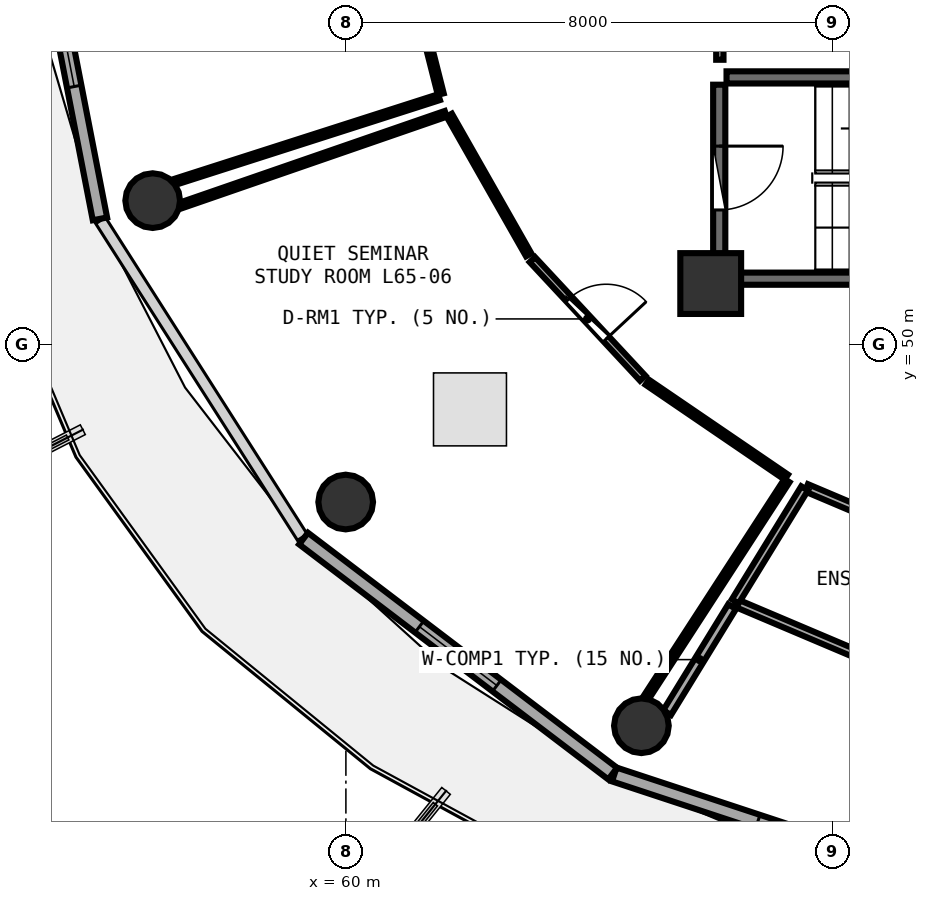
"""IFC4 building model, lengths in metres.
Left out: names, types, materials, properties, quantities, classifications, styles, units other than length and angle.
Written with IfcOpenShell. Run it as: python <this file> out.ifc"""

import sys

from ifc_helpers import new_model, si_unit, direction, frame, frame_2d, origin, origin_2d, place, context, subcontext, project, spatial, rectangle, circle, extrude, element, fill, save


model = new_model("IFC4")
c1 = context("Model", 3, precision=1e-05, world=origin(), true_north=direction((0.0, 1.0)))
c2 = subcontext(c1, "Body", "Model", "MODEL_VIEW")
j1 = project(units=[si_unit("LENGTHUNIT", "METRE"), si_unit("PLANEANGLEUNIT", "RADIAN")], contexts=[c1])
p1 = place(None, origin())
s1 = spatial("IfcSite", under=j1, at=p1, CompositionType="ELEMENT")
p2 = place(p1, origin())
s2 = spatial("IfcBuilding", under=s1, at=p2, CompositionType="ELEMENT")
p3 = place(p2, frame((0.0, 0.0, 256.2)))
s3 = spatial("IfcBuildingStorey", under=s2, at=p3, CompositionType="ELEMENT", Elevation=256.2)
p4 = place(p3, frame((66.0, 51.0, 0.0), z_axis=(0.0, 0.0, 1.0), x_axis=(1.0, 0.0, 0.0)))
e1 = element("IfcColumn", 1, at=p4, inside=s3, PredefinedType="PILASTER", context=c2, shape_type="SweptSolid", body=[
    extrude(rectangle(XDim=1.0, YDim=1.0, at=origin_2d()), origin(), (0.0, 0.0, 1.0), 3.75),
])
for number, where, z_axis, x_axis in (
    (2, (56.823, 52.364, 0.0), (0.0, 0.0, 1.0), (1.0, 0.0, 0.0)),
    (3, (59.997, 47.407, 0.0), (0.0, 0.0, 1.0), (1.0, 0.0, 0.0)),
    (4, (64.86, 43.728, 0.0), (0.0, 0.0, 1.0), (1.0, 0.0, 0.0)),
):
    element("IfcColumn", number, at=place(p3, frame(where, z_axis=z_axis, x_axis=x_axis)), inside=s3, PredefinedType="COLUMN", context=c2, shape_type="SweptSolid", body=[
        extrude(circle(Radius=0.45, at=origin_2d()), origin(), (0.0, 0.0, 1.0), 3.75),
    ])
p5 = place(p3, frame((54.803, 57.985, 0.0), z_axis=(0.0, 0.0, 1.0), x_axis=(0.190969309115, -0.981596008028, 0.0)))
e5 = element("IfcWall", 5, at=p5, inside=s3, PredefinedType="SOLIDWALL", context=c2, shape_type="SweptSolid", body=[
    extrude(rectangle(XDim=6.033, YDim=0.24, at=frame_2d((3.017, 0.0))), origin(), (0.0, 0.0, 1.0), 3.475),
])
p6 = place(p5, frame((2.216, 0.0, 0.85)))
e6 = element("IfcOpeningElement", 6, at=p6, cuts=e5, PredefinedType="OPENING", context=c2, shape_type="SweptSolid", body=[
    extrude(rectangle(XDim=1.6, YDim=1.45, at=frame_2d((0.8, 0.725))), frame((0.0, 0.13, 0.0), z_axis=(0.0, -1.0, 0.0), x_axis=(1.0, 0.0, 0.0)), (0.0, 0.0, 1.0), 0.26),
])
p7 = place(p3, frame((59.304, 46.806, 0.0), z_axis=(0.0, 0.0, 1.0), x_axis=(0.796010444211, -0.605282886514, 0.0)))
e7 = element("IfcWall", 7, at=p7, inside=s3, PredefinedType="SOLIDWALL", context=c2, shape_type="SweptSolid", body=[
    extrude(rectangle(XDim=6.387, YDim=0.24, at=frame_2d((3.194, 0.0))), origin(), (0.0, 0.0, 1.0), 3.475),
])
p8 = place(p7, frame((2.394, 0.0, 0.85)))
e8 = element("IfcOpeningElement", 8, at=p8, cuts=e7, PredefinedType="OPENING", context=c2, shape_type="SweptSolid", body=[
    extrude(rectangle(XDim=1.6, YDim=1.45, at=frame_2d((0.8, 0.725))), frame((0.0, 0.13, 0.0), z_axis=(0.0, -1.0, 0.0), x_axis=(1.0, 0.0, 0.0)), (0.0, 0.0, 1.0), 0.26),
])
p9 = place(p3, frame((64.414, 42.927, 0.0), z_axis=(0.0, 0.0, 1.0), x_axis=(0.949663708393, -0.313271193954, 0.0)))
e9 = element("IfcWall", 9, at=p9, inside=s3, PredefinedType="SOLIDWALL", context=c2, shape_type="SweptSolid", body=[
    extrude(rectangle(XDim=6.568, YDim=0.24, at=frame_2d((3.284, 0.0))), origin(), (0.0, 0.0, 1.0), 3.475),
])
p10 = place(p9, frame((2.484, 0.0, 0.85)))
e10 = element("IfcOpeningElement", 10, at=p10, cuts=e9, PredefinedType="OPENING", context=c2, shape_type="SweptSolid", body=[
    extrude(rectangle(XDim=1.6, YDim=1.45, at=frame_2d((0.8, 0.725))), frame((0.0, 0.13, 0.0), z_axis=(0.0, -1.0, 0.0), x_axis=(1.0, 0.0, 0.0)), (0.0, 0.0, 1.0), 0.26),
])
for number, where, z_axis, x_axis in (
    (11, (66.26, 51.08, 0.0), (0.0, 0.0, 1.0), (1.0, 0.0, 0.0)),
    (12, (73.42, 54.39, 0.0), (0.0, 0.0, 1.0), (-1.0, 0.0, 0.0)),
):
    element("IfcWall", number, at=place(p3, frame(where, z_axis=z_axis, x_axis=x_axis)), inside=s3, PredefinedType="SHEAR", context=c2, shape_type="SweptSolid", body=[
        extrude(rectangle(XDim=7.16, YDim=0.2, at=frame_2d((3.58, 0.0))), origin(), (0.0, 0.0, 1.0), 3.49),
    ])
p11 = place(p3, frame((66.14, 54.27, 0.0), z_axis=(0.0, 0.0, 1.0), x_axis=(0.0, -1.0, 0.0)))
e13 = element("IfcWall", 13, at=p11, inside=s3, PredefinedType="SHEAR", context=c2, shape_type="SweptSolid", body=[
    extrude(rectangle(XDim=3.07, YDim=0.2, at=frame_2d((1.535, 0.0))), origin(), (0.0, 0.0, 1.0), 3.49),
])
p12 = place(p11, frame((1.01, 0.0, 0.0)))
e14 = element("IfcOpeningElement", 14, at=p12, cuts=e13, PredefinedType="OPENING", context=c2, shape_type="SweptSolid", body=[
    extrude(rectangle(XDim=1.05, YDim=2.1, at=frame_2d((0.525, 1.05))), frame((0.0, 0.11, 0.0), z_axis=(0.0, -1.0, 0.0), x_axis=(1.0, 0.0, 0.0)), (0.0, 0.0, 1.0), 0.22),
])
p13 = place(p3, frame((66.15, 54.68, 0.0), z_axis=(0.0, 0.0, 1.0), x_axis=(0.0, 1.0, 0.0)))
e15 = element("IfcWall", 15, at=p13, inside=s3, PredefinedType="PARTITIONING", context=c2, shape_type="SweptSolid", body=[
    extrude(rectangle(XDim=2.11, YDim=0.12, at=frame_2d((1.055, 0.0))), origin(), (0.0, 0.0, 1.0), 2.775),
])
p14 = place(p13, frame((0.605, 0.0, 0.0)))
e16 = element("IfcOpeningElement", 16, at=p14, cuts=e15, PredefinedType="OPENING", context=c2, shape_type="SweptSolid", body=[
    extrude(rectangle(XDim=0.9, YDim=2.08, at=frame_2d((0.45, 1.04))), frame((0.0, 0.07, 0.0), z_axis=(0.0, -1.0, 0.0), x_axis=(1.0, 0.0, 0.0)), (0.0, 0.0, 1.0), 0.14),
])
p15 = place(p3, frame((63.067, 51.393, 0.0), z_axis=(0.0, 0.0, 1.0), x_axis=(0.681315269885, -0.731990097625, 0.0)))
e17 = element("IfcWall", 17, at=p15, inside=s3, PredefinedType="PARTITIONING", context=c2, shape_type="SweptSolid", body=[
    extrude(rectangle(XDim=2.664, YDim=0.12, at=frame_2d((1.332, 0.0))), origin(), (0.0, 0.0, 1.0), 3.075),
])
p16 = place(p15, frame((0.882, 0.0, 0.0)))
e18 = element("IfcOpeningElement", 18, at=p16, cuts=e17, PredefinedType="OPENING", context=c2, shape_type="SweptSolid", body=[
    extrude(rectangle(XDim=0.9, YDim=2.08, at=frame_2d((0.45, 1.04))), frame((0.0, 0.07, 0.0), z_axis=(0.0, -1.0, 0.0), x_axis=(1.0, 0.0, 0.0)), (0.0, 0.0, 1.0), 0.14),
])
p17 = place(p3, frame((60.923, 56.631, 0.0), z_axis=(0.0, 0.0, 1.0), x_axis=(0.245655775867, -0.969357127061, 0.0)))
e19 = element("IfcWall", 19, at=p17, inside=s3, PredefinedType="PARTITIONING", context=c2, shape_type="SweptSolid", body=[
    extrude(rectangle(XDim=2.595, YDim=0.1, at=frame_2d((1.297, 0.0))), origin(), (0.0, 0.0, 1.0), 3.48),
])
p18 = place(p3, frame((61.532, 54.065, 0.0), z_axis=(0.0, 0.0, 1.0), x_axis=(-0.95227750557, -0.305233602976, 0.0)))
e20 = element("IfcWall", 20, at=p18, inside=s3, PredefinedType="PARTITIONING", context=c2, shape_type="SweptSolid", body=[
    extrude(rectangle(XDim=4.565, YDim=0.1, at=frame_2d((2.283, 0.0))), origin(), (0.0, 0.0, 1.0), 3.175),
])
p19 = place(p3, frame((61.7, 53.769, 0.0), z_axis=(0.0, 0.0, 1.0), x_axis=(0.494277588427, -0.869304127207, 0.0)))
e21 = element("IfcWall", 21, at=p19, inside=s3, PredefinedType="PARTITIONING", context=c2, shape_type="SweptSolid", body=[
    extrude(rectangle(XDim=2.643, YDim=0.1, at=frame_2d((1.322, 0.0))), origin(), (0.0, 0.0, 1.0), 3.075),
])
p20 = place(p3, frame((64.956, 49.376, 0.0), z_axis=(0.0, 0.0, 1.0), x_axis=(0.826087380575, -0.563542047814, 0.0)))
e22 = element("IfcWall", 22, at=p20, inside=s3, PredefinedType="PARTITIONING", context=c2, shape_type="SweptSolid", body=[
    extrude(rectangle(XDim=2.768, YDim=0.1, at=frame_2d((1.384, 0.0))), origin(), (0.0, 0.0, 1.0), 3.075),
])
p21 = place(p3, frame((67.254, 47.76, 0.0), z_axis=(0.0, 0.0, 1.0), x_axis=(-0.544234825024, -0.838932926539, 0.0)))
e23 = element("IfcWall", 23, at=p21, inside=s3, PredefinedType="PARTITIONING", context=c2, shape_type="SweptSolid", body=[
    extrude(rectangle(XDim=4.249, YDim=0.1, at=frame_2d((2.125, 0.0))), origin(), (0.0, 0.0, 1.0), 3.075),
])
p22 = place(p3, frame((57.291, 52.287, 0.0), z_axis=(0.0, 0.0, 1.0), x_axis=(0.945103281494, 0.326771766388, 0.0)))
e24 = element("IfcWall", 24, at=p22, inside=s3, PredefinedType="PARTITIONING", context=c2, shape_type="SweptSolid", body=[
    extrude(rectangle(XDim=4.604, YDim=0.1, at=frame_2d((2.302, 0.0))), origin(), (0.0, 0.0, 1.0), 3.075),
])
p23 = place(p3, frame((67.573, 47.641, 0.0), z_axis=(0.0, 0.0, 1.0), x_axis=(0.920910556575, -0.389773968845, 0.0)))
e25 = element("IfcWall", 25, at=p23, inside=s3, PredefinedType="PLUMBINGWALL", context=c2, shape_type="SweptSolid", body=[
    extrude(rectangle(XDim=1.843, YDim=0.13, at=frame_2d((0.921, 0.0))), origin(), (0.0, 0.0, 1.0), 3.48),
])
p24 = place(p3, frame((68.422, 44.897, 0.0), z_axis=(0.0, 0.0, 1.0), x_axis=(-0.920791207069, 0.390055833162, 0.0)))
e26 = element("IfcWall", 26, at=p24, inside=s3, PredefinedType="PLUMBINGWALL", context=c2, shape_type="SweptSolid", body=[
    extrude(rectangle(XDim=2.183, YDim=0.13, at=frame_2d((1.092, 0.0))), origin(), (0.0, 0.0, 1.0), 3.48),
])
p25 = place(p3, frame((66.404, 45.773, 0.0), z_axis=(0.0, 0.0, 1.0), x_axis=(0.523029155304, 0.85231479085, 0.0)))
e27 = element("IfcWall", 27, at=p25, inside=s3, PredefinedType="PLUMBINGWALL", context=c2, shape_type="SweptSolid", body=[
    extrude(rectangle(XDim=2.181, YDim=0.13, at=frame_2d((1.091, 0.0))), origin(), (0.0, 0.0, 1.0), 3.175),
])
p26 = place(p3, frame((65.283, 43.944, 0.0), z_axis=(0.0, 0.0, 1.0), x_axis=(0.522864415557, 0.852415862677, 0.0)))
e28 = element("IfcWall", 28, at=p26, inside=s3, PredefinedType="PARTITIONING", context=c2, shape_type="SweptSolid", body=[
    extrude(rectangle(XDim=2.045, YDim=0.15, at=frame_2d((1.022, 0.0))), origin(), (0.0, 0.0, 1.0), 3.235),
])
p27 = place(p6, origin())
e29 = element("IfcWindow", 29, at=p27, inside=s3, PartitioningType="SINGLE_PANEL", PredefinedType="WINDOW", context=c2, shape_type="SweptSolid", body=[
    extrude(rectangle(XDim=1.6, YDim=1.45, at=frame_2d((0.8, 0.725))), frame((0.0, 0.03, 0.0), z_axis=(0.0, -1.0, 0.0), x_axis=(1.0, 0.0, 0.0)), (0.0, 0.0, 1.0), 0.06),
])
fill(e6, e29)
p28 = place(p8, origin())
e30 = element("IfcWindow", 30, at=p28, inside=s3, PartitioningType="SINGLE_PANEL", PredefinedType="WINDOW", context=c2, shape_type="SweptSolid", body=[
    extrude(rectangle(XDim=1.6, YDim=1.45, at=frame_2d((0.8, 0.725))), frame((0.0, 0.03, 0.0), z_axis=(0.0, -1.0, 0.0), x_axis=(1.0, 0.0, 0.0)), (0.0, 0.0, 1.0), 0.06),
])
fill(e8, e30)
p29 = place(p10, origin())
e31 = element("IfcWindow", 31, at=p29, inside=s3, PartitioningType="SINGLE_PANEL", PredefinedType="WINDOW", context=c2, shape_type="SweptSolid", body=[
    extrude(rectangle(XDim=1.6, YDim=1.45, at=frame_2d((0.8, 0.725))), frame((0.0, 0.03, 0.0), z_axis=(0.0, -1.0, 0.0), x_axis=(1.0, 0.0, 0.0)), (0.0, 0.0, 1.0), 0.06),
])
fill(e10, e31)
p30 = place(p12, origin())
e32 = element("IfcDoor", 32, at=p30, inside=s3, OperationType="SINGLE_SWING_LEFT", PredefinedType="DOOR", context=c2, shape_type="SweptSolid", body=[
    extrude(rectangle(XDim=1.05, YDim=2.1, at=frame_2d((0.525, 1.05))), frame((0.0, 0.025, 0.0), z_axis=(0.0, -1.0, 0.0), x_axis=(1.0, 0.0, 0.0)), (0.0, 0.0, 1.0), 0.05),
])
fill(e14, e32)
p31 = place(p16, origin())
e33 = element("IfcDoor", 33, at=p31, inside=s3, OperationType="SINGLE_SWING_RIGHT", PredefinedType="DOOR", context=c2, shape_type="SweptSolid", body=[
    extrude(rectangle(XDim=0.9, YDim=2.08, at=frame_2d((0.45, 1.04))), frame((0.0, 0.025, 0.0), z_axis=(0.0, -1.0, 0.0), x_axis=(1.0, 0.0, 0.0)), (0.0, 0.0, 1.0), 0.05),
])
fill(e18, e33)
save(model, sys.argv[1])
